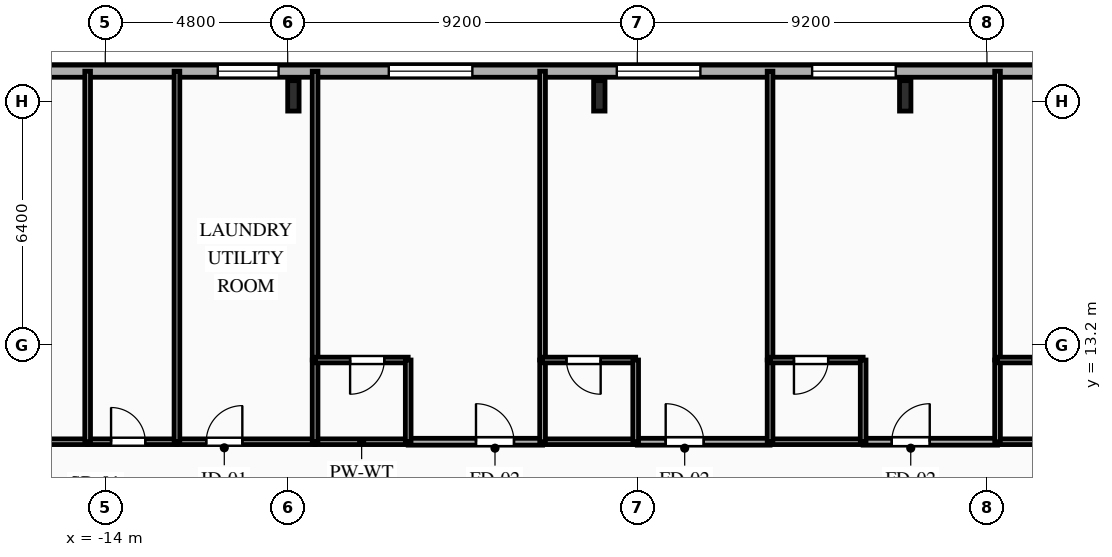
"""IFC4 building model, lengths in metres.
Left out: names, types, materials, properties, quantities, classifications, styles, units other than length and angle.
Written with IfcOpenShell. Run it as: python <this file> out.ifc"""

import sys

from ifc_helpers import new_model, si_unit, direction, frame, frame_2d, origin, origin_2d, place, context, subcontext, project, spatial, rectangle, i_section, extrude, element, fill, save


model = new_model("IFC4")
c1 = context("Model", 3, precision=1e-05, world=origin(), true_north=direction((0.0, 1.0)))
c2 = subcontext(c1, "Body", "Model", "MODEL_VIEW")
j1 = project(units=[si_unit("LENGTHUNIT", "METRE"), si_unit("PLANEANGLEUNIT", "RADIAN")], contexts=[c1])
p1 = place(None, origin())
s1 = spatial("IfcSite", under=j1, at=p1, CompositionType="ELEMENT")
p2 = place(p1, origin())
s2 = spatial("IfcBuilding", under=s1, at=p2, CompositionType="ELEMENT")
p3 = place(p2, frame((0.0, 0.0, 141.05)))
s3 = spatial("IfcBuildingStorey", under=s2, at=p3, CompositionType="ELEMENT", Elevation=141.05)
for number, where, z_axis, x_axis in (
    (1, (7.05, 19.75, 0.0), (0.0, 0.0, 1.0), (1.0, 0.0, 0.0)),
    (2, (-1.0, 19.75, 0.0), (0.0, 0.0, 1.0), (1.0, 0.0, 0.0)),
    (3, (-9.05, 19.75, 0.0), (0.0, 0.0, 1.0), (1.0, 0.0, 0.0)),
):
    element("IfcColumn", number, at=place(p3, frame(where, z_axis=z_axis, x_axis=x_axis)), inside=s3, PredefinedType="COLUMN", context=c2, shape_type="SweptSolid", body=[
        extrude(i_section(OverallWidth=0.3, OverallDepth=0.8, WebThickness=0.018, FlangeThickness=0.033, FilletRadius=0.03, at=origin_2d()), origin(), (0.0, 0.0, 1.0), 3.35),
    ])
p4 = place(p3, frame((-25.8, 20.4, 0.0), z_axis=(0.0, 0.0, 1.0), x_axis=(1.0, 0.0, 0.0)))
e4 = element("IfcWall", 4, at=p4, inside=s3, PredefinedType="SOLIDWALL", context=c2, shape_type="SweptSolid", body=[
    extrude(rectangle(XDim=49.6, YDim=0.32, at=frame_2d((24.8, 0.0))), origin(), (0.0, 0.0, 1.0), 3.04),
])
p5 = place(p4, frame((2.135, 0.0, 0.85)))
e5 = element("IfcOpeningElement", 5, at=p5, cuts=e4, PredefinedType="OPENING", context=c2, shape_type="SweptSolid", body=[
    extrude(rectangle(XDim=1.65, YDim=1.85, at=frame_2d((0.825, 0.925))), frame((0.0, 0.17, 0.0), z_axis=(0.0, -1.0, 0.0), x_axis=(1.0, 0.0, 0.0)), (0.0, 0.0, 1.0), 0.34),
])
p6 = place(p4, frame((6.706, 0.0, 0.85)))
e6 = element("IfcOpeningElement", 6, at=p6, cuts=e4, PredefinedType="OPENING", context=c2, shape_type="SweptSolid", body=[
    extrude(rectangle(XDim=1.65, YDim=1.85, at=frame_2d((0.825, 0.925))), frame((0.0, 0.17, 0.0), z_axis=(0.0, -1.0, 0.0), x_axis=(1.0, 0.0, 0.0)), (0.0, 0.0, 1.0), 0.34),
])
p7 = place(p4, frame((14.76, 0.0, 0.85)))
e7 = element("IfcOpeningElement", 7, at=p7, cuts=e4, PredefinedType="OPENING", context=c2, shape_type="SweptSolid", body=[
    extrude(rectangle(XDim=1.6, YDim=1.85, at=frame_2d((0.8, 0.925))), frame((0.0, 0.17, 0.0), z_axis=(0.0, -1.0, 0.0), x_axis=(1.0, 0.0, 0.0)), (0.0, 0.0, 1.0), 0.34),
])
p8 = place(p4, frame((19.26, 0.0, 0.85)))
e8 = element("IfcOpeningElement", 8, at=p8, cuts=e4, PredefinedType="OPENING", context=c2, shape_type="SweptSolid", body=[
    extrude(rectangle(XDim=2.2, YDim=1.85, at=frame_2d((1.1, 0.925))), frame((0.0, 0.17, 0.0), z_axis=(0.0, -1.0, 0.0), x_axis=(1.0, 0.0, 0.0)), (0.0, 0.0, 1.0), 0.34),
])
p9 = place(p4, frame((25.26, 0.0, 0.85)))
e9 = element("IfcOpeningElement", 9, at=p9, cuts=e4, PredefinedType="OPENING", context=c2, shape_type="SweptSolid", body=[
    extrude(rectangle(XDim=2.2, YDim=1.85, at=frame_2d((1.1, 0.925))), frame((0.0, 0.17, 0.0), z_axis=(0.0, -1.0, 0.0), x_axis=(1.0, 0.0, 0.0)), (0.0, 0.0, 1.0), 0.34),
])
p10 = place(p4, frame((30.4, 0.0, 0.85)))
e10 = element("IfcOpeningElement", 10, at=p10, cuts=e4, PredefinedType="OPENING", context=c2, shape_type="SweptSolid", body=[
    extrude(rectangle(XDim=2.2, YDim=1.85, at=frame_2d((1.1, 0.925))), frame((0.0, 0.17, 0.0), z_axis=(0.0, -1.0, 0.0), x_axis=(1.0, 0.0, 0.0)), (0.0, 0.0, 1.0), 0.34),
])
p11 = place(p4, frame((37.18, 0.0, 0.85)))
e11 = element("IfcOpeningElement", 11, at=p11, cuts=e4, PredefinedType="OPENING", context=c2, shape_type="SweptSolid", body=[
    extrude(rectangle(XDim=2.2, YDim=1.85, at=frame_2d((1.1, 0.925))), frame((0.0, 0.17, 0.0), z_axis=(0.0, -1.0, 0.0), x_axis=(1.0, 0.0, 0.0)), (0.0, 0.0, 1.0), 0.34),
])
p12 = place(p4, frame((43.215, 0.0, 0.85)))
e12 = element("IfcOpeningElement", 12, at=p12, cuts=e4, PredefinedType="OPENING", context=c2, shape_type="SweptSolid", body=[
    extrude(rectangle(XDim=1.65, YDim=1.85, at=frame_2d((0.825, 0.925))), frame((0.0, 0.17, 0.0), z_axis=(0.0, -1.0, 0.0), x_axis=(1.0, 0.0, 0.0)), (0.0, 0.0, 1.0), 0.34),
])
p13 = place(p4, frame((47.45, 0.0, 0.85)))
e13 = element("IfcOpeningElement", 13, at=p13, cuts=e4, PredefinedType="OPENING", context=c2, shape_type="SweptSolid", body=[
    extrude(rectangle(XDim=1.1, YDim=1.85, at=frame_2d((0.55, 0.925))), frame((0.0, 0.17, 0.0), z_axis=(0.0, -1.0, 0.0), x_axis=(1.0, 0.0, 0.0)), (0.0, 0.0, 1.0), 0.34),
])
p14 = place(p3, frame((-20.95, 10.65, 0.0), z_axis=(0.0, 0.0, 1.0), x_axis=(1.0, 0.0, 0.0)))
e14 = element("IfcWall", 14, at=p14, inside=s3, PredefinedType="PARTITIONING", context=c2, shape_type="SweptSolid", body=[
    extrude(rectangle(XDim=6.486, YDim=0.15, at=frame_2d((3.243, 0.0))), origin(), (0.0, 0.0, 1.0), 3.04),
])
p15 = place(p14, frame((4.322, 0.0, 0.0)))
e15 = element("IfcOpeningElement", 15, at=p15, cuts=e14, PredefinedType="OPENING", context=c2, shape_type="SweptSolid", body=[
    extrude(rectangle(XDim=1.05, YDim=2.15, at=frame_2d((0.525, 1.075))), frame((0.0, 0.085, 0.0), z_axis=(0.0, -1.0, 0.0), x_axis=(1.0, 0.0, 0.0)), (0.0, 0.0, 1.0), 0.17),
])
p16 = place(p3, frame((-14.464, 10.65, 0.0), z_axis=(0.0, 0.0, 1.0), x_axis=(1.0, 0.0, 0.0)))
e16 = element("IfcWall", 16, at=p16, inside=s3, PredefinedType="PLUMBINGWALL", context=c2, shape_type="SweptSolid", body=[
    extrude(rectangle(XDim=2.35, YDim=0.15, at=frame_2d((1.175, 0.0))), origin(), (0.0, 0.0, 1.0), 3.04),
])
p17 = place(p16, frame((0.616, 0.0, 0.0)))
e17 = element("IfcOpeningElement", 17, at=p17, cuts=e16, PredefinedType="OPENING", context=c2, shape_type="SweptSolid", body=[
    extrude(rectangle(XDim=0.9, YDim=2.1, at=frame_2d((0.45, 1.05))), frame((0.0, 0.085, 0.0), z_axis=(0.0, -1.0, 0.0), x_axis=(1.0, 0.0, 0.0)), (0.0, 0.0, 1.0), 0.17),
])
p18 = place(p3, frame((-12.114, 10.65, 0.0), z_axis=(0.0, 0.0, 1.0), x_axis=(1.0, 0.0, 0.0)))
e18 = element("IfcWall", 18, at=p18, inside=s3, PredefinedType="PARTITIONING", context=c2, shape_type="SweptSolid", body=[
    extrude(rectangle(XDim=3.635, YDim=0.15, at=frame_2d((1.817, 0.0))), origin(), (0.0, 0.0, 1.0), 3.04),
])
p19 = place(p18, frame((0.771, 0.0, 0.0)))
e19 = element("IfcOpeningElement", 19, at=p19, cuts=e18, PredefinedType="OPENING", context=c2, shape_type="SweptSolid", body=[
    extrude(rectangle(XDim=0.95, YDim=2.1, at=frame_2d((0.475, 1.05))), frame((0.0, 0.085, 0.0), z_axis=(0.0, -1.0, 0.0), x_axis=(1.0, 0.0, 0.0)), (0.0, 0.0, 1.0), 0.17),
])
p20 = place(p3, frame((-6.029, 10.65, 0.0), z_axis=(0.0, 0.0, 1.0), x_axis=(1.0, 0.0, 0.0)))
e20 = element("IfcWall", 20, at=p20, inside=s3, PredefinedType="PARTITIONING", context=c2, shape_type="SweptSolid", body=[
    extrude(rectangle(XDim=3.536, YDim=0.18, at=frame_2d((1.768, 0.0))), origin(), (0.0, 0.0, 1.0), 3.04),
])
p21 = place(p20, frame((1.784, 0.0, 0.0)))
e21 = element("IfcOpeningElement", 21, at=p21, cuts=e20, PredefinedType="OPENING", context=c2, shape_type="SweptSolid", body=[
    extrude(rectangle(XDim=1.0, YDim=2.15, at=frame_2d((0.5, 1.075))), frame((0.0, 0.1, 0.0), z_axis=(0.0, -1.0, 0.0), x_axis=(1.0, 0.0, 0.0)), (0.0, 0.0, 1.0), 0.2),
])
for number, where, z_axis, x_axis in (
    (22, (-8.479, 10.65, 0.0), (0.0, 0.0, 1.0), (1.0, 0.0, 0.0)),
    (23, (-2.493, 10.65, 0.0), (0.0, 0.0, 1.0), (1.0, 0.0, 0.0)),
):
    element("IfcWall", number, at=place(p3, frame(where, z_axis=z_axis, x_axis=x_axis)), inside=s3, PredefinedType="PLUMBINGWALL", context=c2, shape_type="SweptSolid", body=[
        extrude(rectangle(XDim=2.45, YDim=0.15, at=frame_2d((1.225, 0.0))), origin(), (0.0, 0.0, 1.0), 3.04),
    ])
p22 = place(p3, frame((0.0, 10.65, 0.0), z_axis=(0.0, 0.0, 1.0), x_axis=(1.0, 0.0, 0.0)))
e24 = element("IfcWall", 24, at=p22, inside=s3, PredefinedType="PARTITIONING", context=c2, shape_type="SweptSolid", body=[
    extrude(rectangle(XDim=3.493, YDim=0.18, at=frame_2d((1.747, 0.0))), origin(), (0.0, 0.0, 1.0), 3.04),
])
p23 = place(p22, frame((0.747, 0.0, 0.0)))
e25 = element("IfcOpeningElement", 25, at=p23, cuts=e24, PredefinedType="OPENING", context=c2, shape_type="SweptSolid", body=[
    extrude(rectangle(XDim=1.0, YDim=2.15, at=frame_2d((0.5, 1.075))), frame((0.0, 0.1, 0.0), z_axis=(0.0, -1.0, 0.0), x_axis=(1.0, 0.0, 0.0)), (0.0, 0.0, 1.0), 0.2),
])
p24 = place(p3, frame((5.943, 10.65, 0.0), z_axis=(0.0, 0.0, 1.0), x_axis=(1.0, 0.0, 0.0)))
e26 = element("IfcWall", 26, at=p24, inside=s3, PredefinedType="PARTITIONING", context=c2, shape_type="SweptSolid", body=[
    extrude(rectangle(XDim=3.536, YDim=0.18, at=frame_2d((1.768, 0.0))), origin(), (0.0, 0.0, 1.0), 3.04),
])
p25 = place(p24, frame((0.752, 0.0, 0.0)))
e27 = element("IfcOpeningElement", 27, at=p25, cuts=e26, PredefinedType="OPENING", context=c2, shape_type="SweptSolid", body=[
    extrude(rectangle(XDim=1.0, YDim=2.15, at=frame_2d((0.5, 1.075))), frame((0.0, 0.1, 0.0), z_axis=(0.0, -1.0, 0.0), x_axis=(1.0, 0.0, 0.0)), (0.0, 0.0, 1.0), 0.2),
])
p26 = place(p3, frame((3.493, 10.65, 0.0), z_axis=(0.0, 0.0, 1.0), x_axis=(1.0, 0.0, 0.0)))
e28 = element("IfcWall", 28, at=p26, inside=s3, PredefinedType="PLUMBINGWALL", context=c2, shape_type="SweptSolid", body=[
    extrude(rectangle(XDim=2.45, YDim=0.15, at=frame_2d((1.225, 0.0))), origin(), (0.0, 0.0, 1.0), 3.04),
])
p27 = place(p3, frame((9.479, 10.65, 0.0), z_axis=(0.0, 0.0, 1.0), x_axis=(1.0, 0.0, 0.0)))
e29 = element("IfcWall", 29, at=p27, inside=s3, PredefinedType="PLUMBINGWALL", context=c2, shape_type="SweptSolid", body=[
    extrude(rectangle(XDim=2.45, YDim=0.15, at=frame_2d((1.225, 0.0))), origin(), (0.0, 0.0, 1.0), 3.04),
])
for number, where, z_axis, x_axis in (
    (30, (-14.464, 20.4, 0.0), (0.0, 0.0, 1.0), (0.0, -1.0, 0.0)),
    (31, (-12.114, 20.4, 0.0), (0.0, 0.0, 1.0), (0.0, -1.0, 0.0)),
):
    element("IfcWall", number, at=place(p3, frame(where, z_axis=z_axis, x_axis=x_axis)), inside=s3, PredefinedType="PLUMBINGWALL", context=c2, shape_type="SweptSolid", body=[
        extrude(rectangle(XDim=9.75, YDim=0.15, at=frame_2d((4.875, 0.0))), origin(), (0.0, 0.0, 1.0), 3.04),
    ])
p28 = place(p3, frame((-8.479, 20.4, 0.0), z_axis=(0.0, 0.0, 1.0), x_axis=(0.0, -1.0, 0.0)))
e32 = element("IfcWall", 32, at=p28, inside=s3, PredefinedType="PARTITIONING", context=c2, shape_type="SweptSolid", body=[
    extrude(rectangle(XDim=7.6, YDim=0.15, at=frame_2d((3.8, 0.0))), origin(), (0.0, 0.0, 1.0), 3.04),
])
p29 = place(p3, frame((-8.479, 12.8, 0.0), z_axis=(0.0, 0.0, 1.0), x_axis=(0.0, -1.0, 0.0)))
e33 = element("IfcWall", 33, at=p29, inside=s3, PredefinedType="PLUMBINGWALL", context=c2, shape_type="SweptSolid", body=[
    extrude(rectangle(XDim=2.15, YDim=0.15, at=frame_2d((1.075, 0.0))), origin(), (0.0, 0.0, 1.0), 3.04),
])
p30 = place(p3, frame((-6.029, 12.8, 0.0), z_axis=(0.0, 0.0, 1.0), x_axis=(-1.0, 0.0, 0.0)))
e34 = element("IfcWall", 34, at=p30, inside=s3, PredefinedType="PLUMBINGWALL", context=c2, shape_type="SweptSolid", body=[
    extrude(rectangle(XDim=2.45, YDim=0.15, at=frame_2d((1.225, 0.0))), origin(), (0.0, 0.0, 1.0), 3.04),
])
p31 = place(p30, frame((0.629, 0.0, 0.0)))
e35 = element("IfcOpeningElement", 35, at=p31, cuts=e34, PredefinedType="OPENING", context=c2, shape_type="SweptSolid", body=[
    extrude(rectangle(XDim=0.9, YDim=2.1, at=frame_2d((0.45, 1.05))), frame((0.0, 0.085, 0.0), z_axis=(0.0, -1.0, 0.0), x_axis=(1.0, 0.0, 0.0)), (0.0, 0.0, 1.0), 0.17),
])
p32 = place(p3, frame((-6.029, 10.65, 0.0), z_axis=(0.0, 0.0, 1.0), x_axis=(0.0, 1.0, 0.0)))
e36 = element("IfcWall", 36, at=p32, inside=s3, PredefinedType="PLUMBINGWALL", context=c2, shape_type="SweptSolid", body=[
    extrude(rectangle(XDim=2.15, YDim=0.15, at=frame_2d((1.075, 0.0))), origin(), (0.0, 0.0, 1.0), 3.04),
])
p33 = place(p3, frame((-2.493, 20.4, 0.0), z_axis=(0.0, 0.0, 1.0), x_axis=(0.0, -1.0, 0.0)))
e37 = element("IfcWall", 37, at=p33, inside=s3, PredefinedType="PARTITIONING", context=c2, shape_type="SweptSolid", body=[
    extrude(rectangle(XDim=7.6, YDim=0.15, at=frame_2d((3.8, 0.0))), origin(), (0.0, 0.0, 1.0), 3.04),
])
p34 = place(p3, frame((-2.493, 12.8, 0.0), z_axis=(0.0, 0.0, 1.0), x_axis=(0.0, -1.0, 0.0)))
e38 = element("IfcWall", 38, at=p34, inside=s3, PredefinedType="PLUMBINGWALL", context=c2, shape_type="SweptSolid", body=[
    extrude(rectangle(XDim=2.15, YDim=0.15, at=frame_2d((1.075, 0.0))), origin(), (0.0, 0.0, 1.0), 3.04),
])
p35 = place(p3, frame((-0.043, 12.8, 0.0), z_axis=(0.0, 0.0, 1.0), x_axis=(-1.0, 0.0, 0.0)))
e39 = element("IfcWall", 39, at=p35, inside=s3, PredefinedType="PLUMBINGWALL", context=c2, shape_type="SweptSolid", body=[
    extrude(rectangle(XDim=2.45, YDim=0.15, at=frame_2d((1.225, 0.0))), origin(), (0.0, 0.0, 1.0), 3.04),
])
p36 = place(p35, frame((0.921, 0.0, 0.0)))
e40 = element("IfcOpeningElement", 40, at=p36, cuts=e39, PredefinedType="OPENING", context=c2, shape_type="SweptSolid", body=[
    extrude(rectangle(XDim=0.9, YDim=2.1, at=frame_2d((0.45, 1.05))), frame((0.0, 0.085, 0.0), z_axis=(0.0, -1.0, 0.0), x_axis=(1.0, 0.0, 0.0)), (0.0, 0.0, 1.0), 0.17),
])
p37 = place(p3, frame((-0.043, 10.65, 0.0), z_axis=(0.0, 0.0, 1.0), x_axis=(0.0, 1.0, 0.0)))
e41 = element("IfcWall", 41, at=p37, inside=s3, PredefinedType="PLUMBINGWALL", context=c2, shape_type="SweptSolid", body=[
    extrude(rectangle(XDim=2.15, YDim=0.15, at=frame_2d((1.075, 0.0))), origin(), (0.0, 0.0, 1.0), 3.04),
])
p38 = place(p3, frame((3.493, 20.4, 0.0), z_axis=(0.0, 0.0, 1.0), x_axis=(0.0, -1.0, 0.0)))
e42 = element("IfcWall", 42, at=p38, inside=s3, PredefinedType="PARTITIONING", context=c2, shape_type="SweptSolid", body=[
    extrude(rectangle(XDim=7.6, YDim=0.15, at=frame_2d((3.8, 0.0))), origin(), (0.0, 0.0, 1.0), 3.04),
])
p39 = place(p3, frame((3.493, 12.8, 0.0), z_axis=(0.0, 0.0, 1.0), x_axis=(0.0, -1.0, 0.0)))
e43 = element("IfcWall", 43, at=p39, inside=s3, PredefinedType="PLUMBINGWALL", context=c2, shape_type="SweptSolid", body=[
    extrude(rectangle(XDim=2.15, YDim=0.15, at=frame_2d((1.075, 0.0))), origin(), (0.0, 0.0, 1.0), 3.04),
])
p40 = place(p3, frame((5.943, 12.8, 0.0), z_axis=(0.0, 0.0, 1.0), x_axis=(-1.0, 0.0, 0.0)))
e44 = element("IfcWall", 44, at=p40, inside=s3, PredefinedType="PLUMBINGWALL", context=c2, shape_type="SweptSolid", body=[
    extrude(rectangle(XDim=2.45, YDim=0.15, at=frame_2d((1.225, 0.0))), origin(), (0.0, 0.0, 1.0), 3.04),
])
p41 = place(p40, frame((0.921, 0.0, 0.0)))
e45 = element("IfcOpeningElement", 45, at=p41, cuts=e44, PredefinedType="OPENING", context=c2, shape_type="SweptSolid", body=[
    extrude(rectangle(XDim=0.9, YDim=2.1, at=frame_2d((0.45, 1.05))), frame((0.0, 0.085, 0.0), z_axis=(0.0, -1.0, 0.0), x_axis=(1.0, 0.0, 0.0)), (0.0, 0.0, 1.0), 0.17),
])
p42 = place(p3, frame((5.943, 10.65, 0.0), z_axis=(0.0, 0.0, 1.0), x_axis=(0.0, 1.0, 0.0)))
e46 = element("IfcWall", 46, at=p42, inside=s3, PredefinedType="PLUMBINGWALL", context=c2, shape_type="SweptSolid", body=[
    extrude(rectangle(XDim=2.15, YDim=0.15, at=frame_2d((1.075, 0.0))), origin(), (0.0, 0.0, 1.0), 3.04),
])
p43 = place(p3, frame((9.479, 20.4, 0.0), z_axis=(0.0, 0.0, 1.0), x_axis=(0.0, -1.0, 0.0)))
e47 = element("IfcWall", 47, at=p43, inside=s3, PredefinedType="PARTITIONING", context=c2, shape_type="SweptSolid", body=[
    extrude(rectangle(XDim=7.6, YDim=0.15, at=frame_2d((3.8, 0.0))), origin(), (0.0, 0.0, 1.0), 3.04),
])
p44 = place(p3, frame((9.479, 12.8, 0.0), z_axis=(0.0, 0.0, 1.0), x_axis=(0.0, -1.0, 0.0)))
e48 = element("IfcWall", 48, at=p44, inside=s3, PredefinedType="PLUMBINGWALL", context=c2, shape_type="SweptSolid", body=[
    extrude(rectangle(XDim=2.15, YDim=0.15, at=frame_2d((1.075, 0.0))), origin(), (0.0, 0.0, 1.0), 3.04),
])
p45 = place(p3, frame((11.929, 12.8, 0.0), z_axis=(0.0, 0.0, 1.0), x_axis=(-1.0, 0.0, 0.0)))
e49 = element("IfcWall", 49, at=p45, inside=s3, PredefinedType="PLUMBINGWALL", context=c2, shape_type="SweptSolid", body=[
    extrude(rectangle(XDim=2.45, YDim=0.15, at=frame_2d((1.225, 0.0))), origin(), (0.0, 0.0, 1.0), 3.04),
])
p46 = place(p45, frame((0.629, 0.0, 0.0)))
e50 = element("IfcOpeningElement", 50, at=p46, cuts=e49, PredefinedType="OPENING", context=c2, shape_type="SweptSolid", body=[
    extrude(rectangle(XDim=0.9, YDim=2.1, at=frame_2d((0.45, 1.05))), frame((0.0, 0.085, 0.0), z_axis=(0.0, -1.0, 0.0), x_axis=(1.0, 0.0, 0.0)), (0.0, 0.0, 1.0), 0.17),
])
p47 = place(p7, origin())
e51 = element("IfcWindow", 51, at=p47, inside=s3, PartitioningType="SINGLE_PANEL", PredefinedType="WINDOW", context=c2, shape_type="SweptSolid", body=[
    extrude(rectangle(XDim=1.6, YDim=1.85, at=frame_2d((0.8, 0.925))), frame((0.0, 0.03, 0.0), z_axis=(0.0, -1.0, 0.0), x_axis=(1.0, 0.0, 0.0)), (0.0, 0.0, 1.0), 0.06),
])
fill(e7, e51)
p48 = place(p8, origin())
e52 = element("IfcWindow", 52, at=p48, inside=s3, PartitioningType="SINGLE_PANEL", PredefinedType="WINDOW", context=c2, shape_type="SweptSolid", body=[
    extrude(rectangle(XDim=2.2, YDim=1.85, at=frame_2d((1.1, 0.925))), frame((0.0, 0.03, 0.0), z_axis=(0.0, -1.0, 0.0), x_axis=(1.0, 0.0, 0.0)), (0.0, 0.0, 1.0), 0.06),
])
fill(e8, e52)
p49 = place(p9, origin())
e53 = element("IfcWindow", 53, at=p49, inside=s3, PartitioningType="SINGLE_PANEL", PredefinedType="WINDOW", context=c2, shape_type="SweptSolid", body=[
    extrude(rectangle(XDim=2.2, YDim=1.85, at=frame_2d((1.1, 0.925))), frame((0.0, 0.03, 0.0), z_axis=(0.0, -1.0, 0.0), x_axis=(1.0, 0.0, 0.0)), (0.0, 0.0, 1.0), 0.06),
])
fill(e9, e53)
p50 = place(p10, origin())
e54 = element("IfcWindow", 54, at=p50, inside=s3, PartitioningType="SINGLE_PANEL", PredefinedType="WINDOW", context=c2, shape_type="SweptSolid", body=[
    extrude(rectangle(XDim=2.2, YDim=1.85, at=frame_2d((1.1, 0.925))), frame((0.0, 0.03, 0.0), z_axis=(0.0, -1.0, 0.0), x_axis=(1.0, 0.0, 0.0)), (0.0, 0.0, 1.0), 0.06),
])
fill(e10, e54)
p51 = place(p17, origin())
e55 = element("IfcDoor", 55, at=p51, inside=s3, OperationType="SINGLE_SWING_LEFT", PredefinedType="DOOR", context=c2, shape_type="SweptSolid", body=[
    extrude(rectangle(XDim=0.9, YDim=2.1, at=frame_2d((0.45, 1.05))), frame((0.0, 0.025, 0.0), z_axis=(0.0, -1.0, 0.0), x_axis=(1.0, 0.0, 0.0)), (0.0, 0.0, 1.0), 0.05),
])
fill(e17, e55)
p52 = place(p19, origin())
e56 = element("IfcDoor", 56, at=p52, inside=s3, OperationType="SINGLE_SWING_RIGHT", PredefinedType="DOOR", context=c2, shape_type="SweptSolid", body=[
    extrude(rectangle(XDim=0.95, YDim=2.1, at=frame_2d((0.475, 1.05))), frame((0.0, 0.025, 0.0), z_axis=(0.0, -1.0, 0.0), x_axis=(1.0, 0.0, 0.0)), (0.0, 0.0, 1.0), 0.05),
])
fill(e19, e56)
p53 = place(p21, origin())
e57 = element("IfcDoor", 57, at=p53, inside=s3, OperationType="SINGLE_SWING_LEFT", PredefinedType="DOOR", context=c2, shape_type="SweptSolid", body=[
    extrude(rectangle(XDim=1.0, YDim=2.15, at=frame_2d((0.5, 1.075))), frame((0.0, 0.025, 0.0), z_axis=(0.0, -1.0, 0.0), x_axis=(1.0, 0.0, 0.0)), (0.0, 0.0, 1.0), 0.05),
])
fill(e21, e57)
p54 = place(p23, origin())
e58 = element("IfcDoor", 58, at=p54, inside=s3, OperationType="SINGLE_SWING_LEFT", PredefinedType="DOOR", context=c2, shape_type="SweptSolid", body=[
    extrude(rectangle(XDim=1.0, YDim=2.15, at=frame_2d((0.5, 1.075))), frame((0.0, 0.025, 0.0), z_axis=(0.0, -1.0, 0.0), x_axis=(1.0, 0.0, 0.0)), (0.0, 0.0, 1.0), 0.05),
])
fill(e25, e58)
p55 = place(p25, origin())
e59 = element("IfcDoor", 59, at=p55, inside=s3, OperationType="SINGLE_SWING_RIGHT", PredefinedType="DOOR", context=c2, shape_type="SweptSolid", body=[
    extrude(rectangle(XDim=1.0, YDim=2.15, at=frame_2d((0.5, 1.075))), frame((0.0, 0.025, 0.0), z_axis=(0.0, -1.0, 0.0), x_axis=(1.0, 0.0, 0.0)), (0.0, 0.0, 1.0), 0.05),
])
fill(e27, e59)
p56 = place(p31, origin())
e60 = element("IfcDoor", 60, at=p56, inside=s3, OperationType="SINGLE_SWING_RIGHT", PredefinedType="DOOR", context=c2, shape_type="SweptSolid", body=[
    extrude(rectangle(XDim=0.9, YDim=2.1, at=frame_2d((0.45, 1.05))), frame((0.0, 0.025, 0.0), z_axis=(0.0, -1.0, 0.0), x_axis=(1.0, 0.0, 0.0)), (0.0, 0.0, 1.0), 0.05),
])
fill(e35, e60)
p57 = place(p36, origin())
e61 = element("IfcDoor", 61, at=p57, inside=s3, OperationType="SINGLE_SWING_LEFT", PredefinedType="DOOR", context=c2, shape_type="SweptSolid", body=[
    extrude(rectangle(XDim=0.9, YDim=2.1, at=frame_2d((0.45, 1.05))), frame((0.0, 0.025, 0.0), z_axis=(0.0, -1.0, 0.0), x_axis=(1.0, 0.0, 0.0)), (0.0, 0.0, 1.0), 0.05),
])
fill(e40, e61)
p58 = place(p41, origin())
e62 = element("IfcDoor", 62, at=p58, inside=s3, OperationType="SINGLE_SWING_RIGHT", PredefinedType="DOOR", context=c2, shape_type="SweptSolid", body=[
    extrude(rectangle(XDim=0.9, YDim=2.1, at=frame_2d((0.45, 1.05))), frame((0.0, 0.025, 0.0), z_axis=(0.0, -1.0, 0.0), x_axis=(1.0, 0.0, 0.0)), (0.0, 0.0, 1.0), 0.05),
])
fill(e45, e62)
p59 = place(p46, origin())
e63 = element("IfcDoor", 63, at=p59, inside=s3, OperationType="SINGLE_SWING_LEFT", PredefinedType="DOOR", context=c2, shape_type="SweptSolid", body=[
    extrude(rectangle(XDim=0.9, YDim=2.1, at=frame_2d((0.45, 1.05))), frame((0.0, 0.025, 0.0), z_axis=(0.0, -1.0, 0.0), x_axis=(1.0, 0.0, 0.0)), (0.0, 0.0, 1.0), 0.05),
])
fill(e50, e63)
save(model, sys.argv[1])
